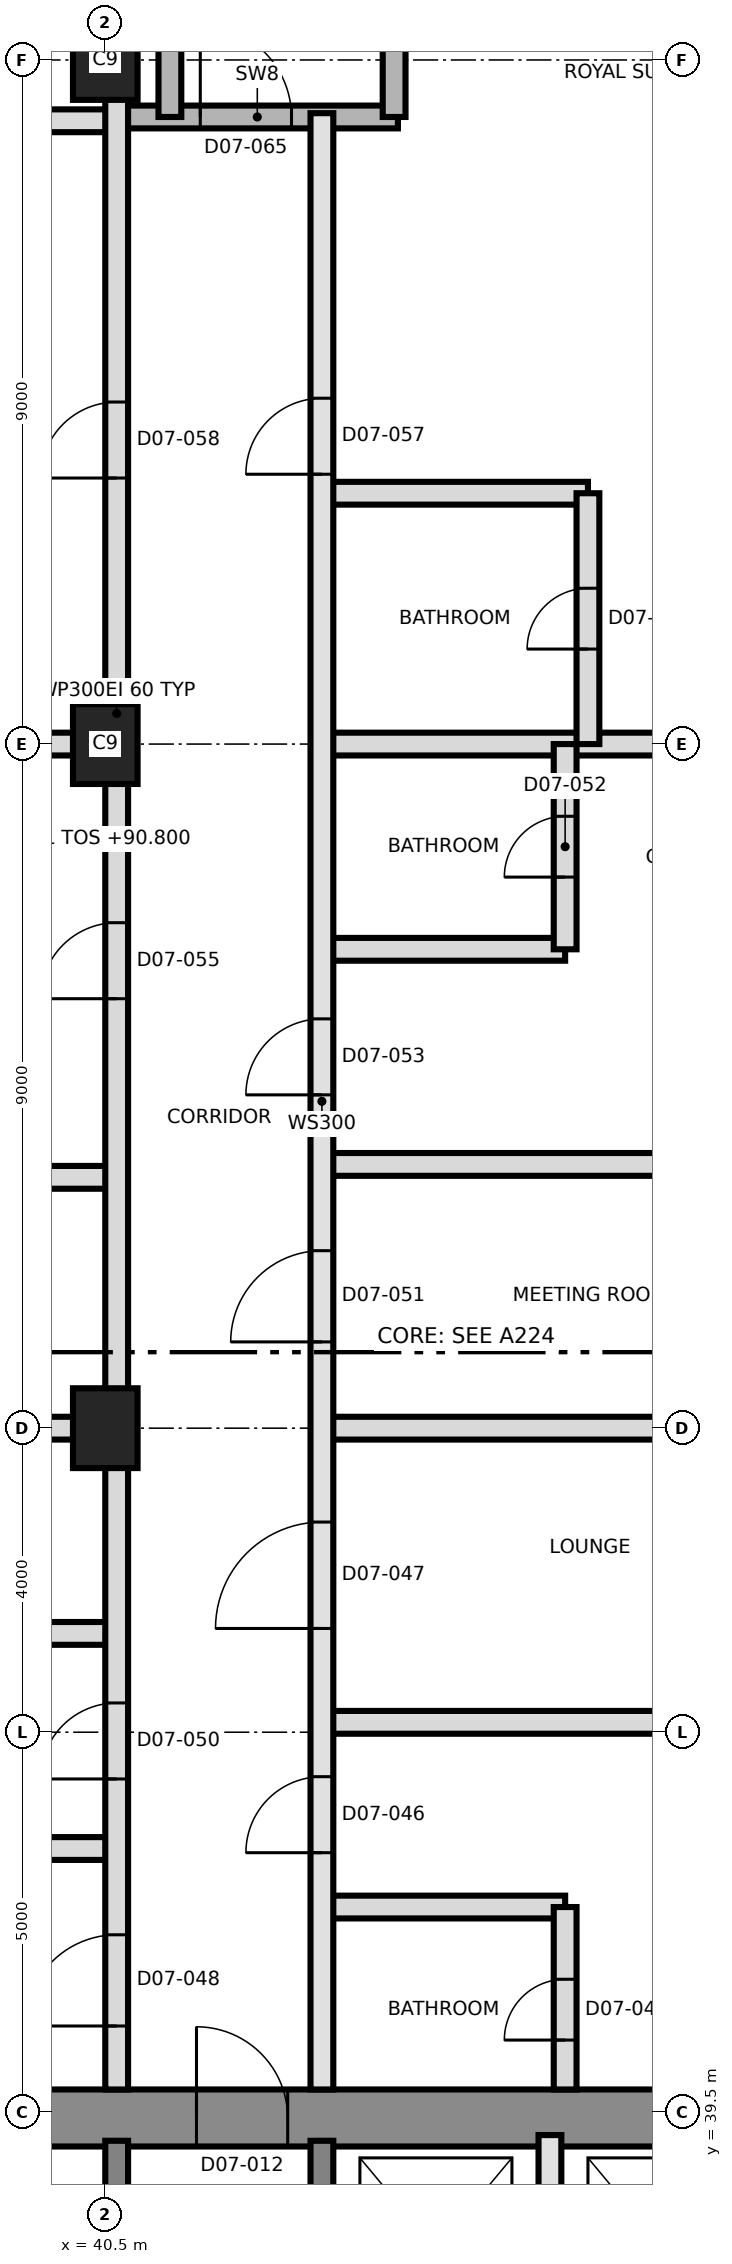
"""IFC4 building model, lengths in metres.
Left out: names, types, materials, properties, quantities, classifications, styles, units other than length and angle.
Written with IfcOpenShell. Run it as: python <this file> out.ifc"""

import sys

from ifc_helpers import new_model, si_unit, direction, frame, frame_2d, origin, origin_2d, place, context, subcontext, project, spatial, rectangle, extrude, element, fill, save


model = new_model("IFC4")
c1 = context("Model", 3, precision=1e-05, world=origin(), true_north=direction((0.0, 1.0)))
c2 = subcontext(c1, "Body", "Model", "MODEL_VIEW")
j1 = project(units=[si_unit("LENGTHUNIT", "METRE"), si_unit("PLANEANGLEUNIT", "RADIAN")], contexts=[c1])
p1 = place(None, origin())
s1 = spatial("IfcSite", under=j1, at=p1, CompositionType="ELEMENT")
p2 = place(p1, origin())
s2 = spatial("IfcBuilding", under=s1, at=p2, CompositionType="ELEMENT")
p3 = place(p2, frame((0.0, 0.0, 90.8)))
s3 = spatial("IfcBuildingStorey", under=s2, at=p3, CompositionType="ELEMENT", Elevation=90.8)
p4 = place(p3, frame((31.125, 39.425, 0.0), z_axis=(0.0, 0.0, 1.0), x_axis=(1.0, 0.0, 0.0)))
e1 = element("IfcWall", 1, at=p4, inside=s3, PredefinedType="SHEAR", context=c2, shape_type="SweptSolid", body=[
    extrude(rectangle(XDim=27.0, YDim=0.75, at=frame_2d((13.5, 0.0))), origin(), (0.0, 0.0, 1.0), 3.7),
])
p5 = place(p4, frame((10.575, 0.0, 0.0)))
e2 = element("IfcOpeningElement", 2, at=p5, cuts=e1, PredefinedType="OPENING", context=c2, shape_type="SweptSolid", body=[
    extrude(rectangle(XDim=1.2, YDim=2.1, at=frame_2d((0.6, 1.05))), frame((0.0, 0.385, 0.0), z_axis=(0.0, -1.0, 0.0), x_axis=(1.0, 0.0, 0.0)), (0.0, 0.0, 1.0), 0.77),
])
for number, where, z_axis, x_axis in (
    (3, (40.65, 33.5, 0.0), (0.0, 0.0, 1.0), (0.0, 1.0, 0.0)),
    (4, (43.35, 33.5, 0.0), (0.0, 0.0, 1.0), (0.0, 1.0, 0.0)),
):
    element("IfcWall", number, at=place(p3, frame(where, z_axis=z_axis, x_axis=x_axis)), inside=s3, PredefinedType="SHEAR", context=c2, shape_type="SweptSolid", body=[
        extrude(rectangle(XDim=5.625, YDim=0.3, at=frame_2d((2.812, 0.0))), origin(), (0.0, 0.0, 1.0), 3.7),
    ])
for number, where, z_axis, x_axis in (
    (5, (40.5, 48.5, 0.0), (0.0, 0.0, 1.0), (0.0, 1.0, 0.0)),
    (6, (40.5, 57.5, 0.0), (0.0, 0.0, 1.0), (0.0, 1.0, 0.0)),
    (7, (40.5, 66.5, 0.0), (0.0, 0.0, 1.0), (0.0, 1.0, 0.0)),
):
    element("IfcColumn", number, at=place(p3, frame(where, z_axis=z_axis, x_axis=x_axis)), inside=s3, PredefinedType="COLUMN", context=c2, shape_type="SweptSolid", body=[
        extrude(rectangle(XDim=1.05, YDim=0.85, at=origin_2d()), origin(), (0.0, 0.0, 1.0), 3.7),
    ])
p6 = place(p3, frame((46.35, 36.2, 0.0), z_axis=(0.0, 0.0, 1.0), x_axis=(0.0, 1.0, 0.0)))
e8 = element("IfcWall", 8, at=p6, inside=s3, PredefinedType="SOLIDWALL", context=c2, shape_type="SweptSolid", body=[
    extrude(rectangle(XDim=3.0, YDim=0.3, at=frame_2d((1.5, 0.0))), origin(), (0.0, 0.0, 1.0), 3.4),
])
p7 = place(p3, frame((43.35, 42.2, 0.0), z_axis=(0.0, 0.0, 1.0), x_axis=(1.0, 0.0, 0.0)))
e9 = element("IfcWall", 9, at=p7, inside=s3, PredefinedType="PARTITIONING", context=c2, shape_type="SweptSolid", body=[
    extrude(rectangle(XDim=3.2, YDim=0.3, at=frame_2d((1.6, 0.0))), origin(), (0.0, 0.0, 1.0), 3.4),
])
p8 = place(p3, frame((30.995, 42.97, 0.0), z_axis=(0.0, 0.0, 1.0), x_axis=(1.0, 0.0, 0.0)))
e10 = element("IfcWall", 10, at=p8, inside=s3, PredefinedType="PARTITIONING", context=c2, shape_type="SweptSolid", body=[
    extrude(rectangle(XDim=9.655, YDim=0.3, at=frame_2d((4.827, 0.0))), origin(), (0.0, 0.0, 1.0), 3.4),
])
p9 = place(p3, frame((43.35, 44.63, 0.0), z_axis=(0.0, 0.0, 1.0), x_axis=(1.0, 0.0, 0.0)))
e11 = element("IfcWall", 11, at=p9, inside=s3, PredefinedType="PARTITIONING", context=c2, shape_type="SweptSolid", body=[
    extrude(rectangle(XDim=7.032, YDim=0.3, at=frame_2d((3.516, 0.0))), origin(), (0.0, 0.0, 1.0), 3.4),
])
p10 = place(p3, frame((37.45, 45.8, 0.0), z_axis=(0.0, 0.0, 1.0), x_axis=(1.0, 0.0, 0.0)))
e12 = element("IfcWall", 12, at=p10, inside=s3, PredefinedType="PARTITIONING", context=c2, shape_type="SweptSolid", body=[
    extrude(rectangle(XDim=3.2, YDim=0.3, at=frame_2d((1.6, 0.0))), origin(), (0.0, 0.0, 1.0), 3.4),
])
p11 = place(p3, frame((30.995, 48.5, 0.0), z_axis=(0.0, 0.0, 1.0), x_axis=(1.0, 0.0, 0.0)))
e13 = element("IfcWall", 13, at=p11, inside=s3, PredefinedType="PARTITIONING", context=c2, shape_type="SweptSolid", body=[
    extrude(rectangle(XDim=9.655, YDim=0.3, at=frame_2d((4.827, 0.0))), origin(), (0.0, 0.0, 1.0), 3.4),
])
p12 = place(p3, frame((43.35, 48.5, 0.0), z_axis=(0.0, 0.0, 1.0), x_axis=(1.0, 0.0, 0.0)))
e14 = element("IfcWall", 14, at=p12, inside=s3, PredefinedType="PARTITIONING", context=c2, shape_type="SweptSolid", body=[
    extrude(rectangle(XDim=6.655, YDim=0.3, at=frame_2d((3.327, 0.0))), origin(), (0.0, 0.0, 1.0), 3.4),
])
p13 = place(p3, frame((37.15, 51.8, 0.0), z_axis=(0.0, 0.0, 1.0), x_axis=(1.0, 0.0, 0.0)))
e15 = element("IfcWall", 15, at=p13, inside=s3, PredefinedType="PARTITIONING", context=c2, shape_type="SweptSolid", body=[
    extrude(rectangle(XDim=3.5, YDim=0.3, at=frame_2d((1.75, 0.0))), origin(), (0.0, 0.0, 1.0), 3.4),
])
p14 = place(p3, frame((43.35, 51.97, 0.0), z_axis=(0.0, 0.0, 1.0), x_axis=(1.0, 0.0, 0.0)))
e16 = element("IfcWall", 16, at=p14, inside=s3, PredefinedType="PARTITIONING", context=c2, shape_type="SweptSolid", body=[
    extrude(rectangle(XDim=6.795, YDim=0.3, at=frame_2d((3.397, 0.0))), origin(), (0.0, 0.0, 1.0), 3.4),
])
p15 = place(p3, frame((43.35, 54.8, 0.0), z_axis=(0.0, 0.0, 1.0), x_axis=(1.0, 0.0, 0.0)))
e17 = element("IfcWall", 17, at=p15, inside=s3, PredefinedType="PARTITIONING", context=c2, shape_type="SweptSolid", body=[
    extrude(rectangle(XDim=3.2, YDim=0.3, at=frame_2d((1.6, 0.0))), origin(), (0.0, 0.0, 1.0), 3.4),
])
p16 = place(p3, frame((30.995, 57.5, 0.0), z_axis=(0.0, 0.0, 1.0), x_axis=(1.0, 0.0, 0.0)))
e18 = element("IfcWall", 18, at=p16, inside=s3, PredefinedType="PARTITIONING", context=c2, shape_type="SweptSolid", body=[
    extrude(rectangle(XDim=9.655, YDim=0.3, at=frame_2d((4.827, 0.0))), origin(), (0.0, 0.0, 1.0), 3.4),
])
p17 = place(p3, frame((43.35, 57.5, 0.0), z_axis=(0.0, 0.0, 1.0), x_axis=(1.0, 0.0, 0.0)))
e19 = element("IfcWall", 19, at=p17, inside=s3, PredefinedType="PARTITIONING", context=c2, shape_type="SweptSolid", body=[
    extrude(rectangle(XDim=6.655, YDim=0.3, at=frame_2d((3.327, 0.0))), origin(), (0.0, 0.0, 1.0), 3.4),
])
p18 = place(p3, frame((43.35, 60.8, 0.0), z_axis=(0.0, 0.0, 1.0), x_axis=(1.0, 0.0, 0.0)))
e20 = element("IfcWall", 20, at=p18, inside=s3, PredefinedType="PARTITIONING", context=c2, shape_type="SweptSolid", body=[
    extrude(rectangle(XDim=3.5, YDim=0.3, at=frame_2d((1.75, 0.0))), origin(), (0.0, 0.0, 1.0), 3.4),
])
p19 = place(p3, frame((30.995, 65.7, 0.0), z_axis=(0.0, 0.0, 1.0), x_axis=(1.0, 0.0, 0.0)))
e21 = element("IfcWall", 21, at=p19, inside=s3, PredefinedType="PARTITIONING", context=c2, shape_type="SweptSolid", body=[
    extrude(rectangle(XDim=9.655, YDim=0.3, at=frame_2d((4.827, 0.0))), origin(), (0.0, 0.0, 1.0), 3.4),
])
p20 = place(p19, frame((4.005, 0.0, 0.0)))
e22 = element("IfcOpeningElement", 22, at=p20, cuts=e21, PredefinedType="OPENING", context=c2, shape_type="SweptSolid", body=[
    extrude(rectangle(XDim=1.0, YDim=2.1, at=frame_2d((0.5, 1.05))), frame((0.0, 0.16, 0.0), z_axis=(0.0, -1.0, 0.0), x_axis=(1.0, 0.0, 0.0)), (0.0, 0.0, 1.0), 0.32),
])
p21 = place(p3, frame((40.65, 65.75, 0.0), z_axis=(0.0, 0.0, 1.0), x_axis=(1.0, 0.0, 0.0)))
e23 = element("IfcWall", 23, at=p21, inside=s3, PredefinedType="SHEAR", context=c2, shape_type="SweptSolid", body=[
    extrude(rectangle(XDim=3.7, YDim=0.3, at=frame_2d((1.85, 0.0))), origin(), (0.0, 0.0, 1.0), 3.4),
])
p22 = place(p21, frame((1.1, 0.0, 0.0)))
e24 = element("IfcOpeningElement", 24, at=p22, cuts=e23, PredefinedType="OPENING", context=c2, shape_type="SweptSolid", body=[
    extrude(rectangle(XDim=1.2, YDim=2.1, at=frame_2d((0.6, 1.05))), frame((0.0, 0.16, 0.0), z_axis=(0.0, -1.0, 0.0), x_axis=(1.0, 0.0, 0.0)), (0.0, 0.0, 1.0), 0.32),
])
p23 = place(p3, frame((40.65, 39.8, 0.0), z_axis=(0.0, 0.0, 1.0), x_axis=(0.0, 1.0, 0.0)))
e25 = element("IfcWall", 25, at=p23, inside=s3, PredefinedType="PARTITIONING", context=c2, shape_type="SweptSolid", body=[
    extrude(rectangle(XDim=36.205, YDim=0.3, at=frame_2d((18.103, 0.0))), origin(), (0.0, 0.0, 1.0), 3.4),
])
p24 = place(p23, frame((0.835, 0.0, 0.0)))
e26 = element("IfcOpeningElement", 26, at=p24, cuts=e25, PredefinedType="OPENING", context=c2, shape_type="SweptSolid", body=[
    extrude(rectangle(XDim=1.2, YDim=2.1, at=frame_2d((0.6, 1.05))), frame((0.0, 0.16, 0.0), z_axis=(0.0, -1.0, 0.0), x_axis=(1.0, 0.0, 0.0)), (0.0, 0.0, 1.0), 0.32),
])
p25 = place(p23, frame((4.085, 0.0, 0.0)))
e27 = element("IfcOpeningElement", 27, at=p25, cuts=e25, PredefinedType="OPENING", context=c2, shape_type="SweptSolid", body=[
    extrude(rectangle(XDim=1.0, YDim=2.1, at=frame_2d((0.5, 1.05))), frame((0.0, 0.16, 0.0), z_axis=(0.0, -1.0, 0.0), x_axis=(1.0, 0.0, 0.0)), (0.0, 0.0, 1.0), 0.32),
])
p26 = place(p23, frame((14.35, 0.0, 0.0)))
e28 = element("IfcOpeningElement", 28, at=p26, cuts=e25, PredefinedType="OPENING", context=c2, shape_type="SweptSolid", body=[
    extrude(rectangle(XDim=1.0, YDim=2.4, at=frame_2d((0.5, 1.2))), frame((0.0, 0.16, 0.0), z_axis=(0.0, -1.0, 0.0), x_axis=(1.0, 0.0, 0.0)), (0.0, 0.0, 1.0), 0.32),
])
p27 = place(p23, frame((21.2, 0.0, 0.0)))
e29 = element("IfcOpeningElement", 29, at=p27, cuts=e25, PredefinedType="OPENING", context=c2, shape_type="SweptSolid", body=[
    extrude(rectangle(XDim=1.0, YDim=2.4, at=frame_2d((0.5, 1.2))), frame((0.0, 0.16, 0.0), z_axis=(0.0, -1.0, 0.0), x_axis=(1.0, 0.0, 0.0)), (0.0, 0.0, 1.0), 0.32),
])
p28 = place(p3, frame((41.35, 65.75, 0.0), z_axis=(0.0, 0.0, 1.0), x_axis=(0.0, 1.0, 0.0)))
e30 = element("IfcWall", 30, at=p28, inside=s3, PredefinedType="SHEAR", context=c2, shape_type="SweptSolid", body=[
    extrude(rectangle(XDim=8.85, YDim=0.3, at=frame_2d((4.425, 0.0))), origin(), (0.0, 0.0, 1.0), 3.4),
])
p29 = place(p3, frame((43.35, 39.8, 0.0), z_axis=(0.0, 0.0, 1.0), x_axis=(0.0, 1.0, 0.0)))
e31 = element("IfcWall", 31, at=p29, inside=s3, PredefinedType="SOLIDWALL", context=c2, shape_type="SweptSolid", body=[
    extrude(rectangle(XDim=26.0, YDim=0.3, at=frame_2d((13.0, 0.0))), origin(), (0.0, 0.0, 1.0), 3.4),
])
p30 = place(p29, frame((3.115, 0.0, 0.0)))
e32 = element("IfcOpeningElement", 32, at=p30, cuts=e31, PredefinedType="OPENING", context=c2, shape_type="SweptSolid", body=[
    extrude(rectangle(XDim=1.0, YDim=2.1, at=frame_2d((0.5, 1.05))), frame((0.0, 0.16, 0.0), z_axis=(0.0, -1.0, 0.0), x_axis=(1.0, 0.0, 0.0)), (0.0, 0.0, 1.0), 0.32),
])
p31 = place(p29, frame((6.065, 0.0, 0.0)))
e33 = element("IfcOpeningElement", 33, at=p31, cuts=e31, PredefinedType="OPENING", context=c2, shape_type="SweptSolid", body=[
    extrude(rectangle(XDim=1.4, YDim=2.1, at=frame_2d((0.7, 1.05))), frame((0.0, 0.16, 0.0), z_axis=(0.0, -1.0, 0.0), x_axis=(1.0, 0.0, 0.0)), (0.0, 0.0, 1.0), 0.32),
])
p32 = place(p29, frame((9.835, 0.0, 0.0)))
e34 = element("IfcOpeningElement", 34, at=p32, cuts=e31, PredefinedType="OPENING", context=c2, shape_type="SweptSolid", body=[
    extrude(rectangle(XDim=1.2, YDim=2.1, at=frame_2d((0.6, 1.05))), frame((0.0, 0.16, 0.0), z_axis=(0.0, -1.0, 0.0), x_axis=(1.0, 0.0, 0.0)), (0.0, 0.0, 1.0), 0.32),
])
p33 = place(p29, frame((13.085, 0.0, 0.0)))
e35 = element("IfcOpeningElement", 35, at=p33, cuts=e31, PredefinedType="OPENING", context=c2, shape_type="SweptSolid", body=[
    extrude(rectangle(XDim=1.0, YDim=2.1, at=frame_2d((0.5, 1.05))), frame((0.0, 0.16, 0.0), z_axis=(0.0, -1.0, 0.0), x_axis=(1.0, 0.0, 0.0)), (0.0, 0.0, 1.0), 0.32),
])
p34 = place(p29, frame((21.25, 0.0, 0.0)))
e36 = element("IfcOpeningElement", 36, at=p34, cuts=e31, PredefinedType="OPENING", context=c2, shape_type="SweptSolid", body=[
    extrude(rectangle(XDim=1.0, YDim=2.4, at=frame_2d((0.5, 1.2))), frame((0.0, 0.16, 0.0), z_axis=(0.0, -1.0, 0.0), x_axis=(1.0, 0.0, 0.0)), (0.0, 0.0, 1.0), 0.32),
])
p35 = place(p3, frame((44.3, 65.75, 0.0), z_axis=(0.0, 0.0, 1.0), x_axis=(0.0, 1.0, 0.0)))
e37 = element("IfcWall", 37, at=p35, inside=s3, PredefinedType="SHEAR", context=c2, shape_type="SweptSolid", body=[
    extrude(rectangle(XDim=8.85, YDim=0.3, at=frame_2d((4.425, 0.0))), origin(), (0.0, 0.0, 1.0), 3.4),
])
p36 = place(p3, frame((46.55, 39.8, 0.0), z_axis=(0.0, 0.0, 1.0), x_axis=(0.0, 1.0, 0.0)))
e38 = element("IfcWall", 38, at=p36, inside=s3, PredefinedType="PARTITIONING", context=c2, shape_type="SweptSolid", body=[
    extrude(rectangle(XDim=2.4, YDim=0.3, at=frame_2d((1.2, 0.0))), origin(), (0.0, 0.0, 1.0), 3.4),
])
p37 = place(p36, frame((0.65, 0.0, 0.0)))
e39 = element("IfcOpeningElement", 39, at=p37, cuts=e38, PredefinedType="OPENING", context=c2, shape_type="SweptSolid", body=[
    extrude(rectangle(XDim=0.8, YDim=2.1, at=frame_2d((0.4, 1.05))), frame((0.0, 0.16, 0.0), z_axis=(0.0, -1.0, 0.0), x_axis=(1.0, 0.0, 0.0)), (0.0, 0.0, 1.0), 0.32),
])
p38 = place(p3, frame((46.55, 54.8, 0.0), z_axis=(0.0, 0.0, 1.0), x_axis=(0.0, 1.0, 0.0)))
e40 = element("IfcWall", 40, at=p38, inside=s3, PredefinedType="PARTITIONING", context=c2, shape_type="SweptSolid", body=[
    extrude(rectangle(XDim=2.7, YDim=0.3, at=frame_2d((1.35, 0.0))), origin(), (0.0, 0.0, 1.0), 3.4),
])
p39 = place(p38, frame((0.95, 0.0, 0.0)))
e41 = element("IfcOpeningElement", 41, at=p39, cuts=e40, PredefinedType="OPENING", context=c2, shape_type="SweptSolid", body=[
    extrude(rectangle(XDim=0.8, YDim=2.1, at=frame_2d((0.4, 1.05))), frame((0.0, 0.16, 0.0), z_axis=(0.0, -1.0, 0.0), x_axis=(1.0, 0.0, 0.0)), (0.0, 0.0, 1.0), 0.32),
])
p40 = place(p3, frame((46.85, 57.5, 0.0), z_axis=(0.0, 0.0, 1.0), x_axis=(0.0, 1.0, 0.0)))
e42 = element("IfcWall", 42, at=p40, inside=s3, PredefinedType="PARTITIONING", context=c2, shape_type="SweptSolid", body=[
    extrude(rectangle(XDim=3.3, YDim=0.3, at=frame_2d((1.65, 0.0))), origin(), (0.0, 0.0, 1.0), 3.4),
])
p41 = place(p40, frame((1.25, 0.0, 0.0)))
e43 = element("IfcOpeningElement", 43, at=p41, cuts=e42, PredefinedType="OPENING", context=c2, shape_type="SweptSolid", body=[
    extrude(rectangle(XDim=0.8, YDim=2.1, at=frame_2d((0.4, 1.05))), frame((0.0, 0.16, 0.0), z_axis=(0.0, -1.0, 0.0), x_axis=(1.0, 0.0, 0.0)), (0.0, 0.0, 1.0), 0.32),
])
p42 = place(p5, origin())
e44 = element("IfcDoor", 44, at=p42, inside=s3, OperationType="SINGLE_SWING_RIGHT", PredefinedType="DOOR", context=c2, shape_type="SweptSolid", body=[
    extrude(rectangle(XDim=1.2, YDim=2.1, at=frame_2d((0.6, 1.05))), frame((0.0, 0.025, 0.0), z_axis=(0.0, -1.0, 0.0), x_axis=(1.0, 0.0, 0.0)), (0.0, 0.0, 1.0), 0.05),
])
fill(e2, e44)
p43 = place(p37, origin())
e45 = element("IfcDoor", 45, at=p43, inside=s3, OperationType="SINGLE_SWING_RIGHT", PredefinedType="DOOR", context=c2, shape_type="SweptSolid", body=[
    extrude(rectangle(XDim=0.8, YDim=2.1, at=frame_2d((0.4, 1.05))), frame((0.0, 0.025, 0.0), z_axis=(0.0, -1.0, 0.0), x_axis=(1.0, 0.0, 0.0)), (0.0, 0.0, 1.0), 0.05),
])
fill(e39, e45)
p44 = place(p30, origin())
e46 = element("IfcDoor", 46, at=p44, inside=s3, OperationType="SINGLE_SWING_LEFT", PredefinedType="DOOR", context=c2, shape_type="SweptSolid", body=[
    extrude(rectangle(XDim=1.0, YDim=2.1, at=frame_2d((0.5, 1.05))), frame((0.0, 0.025, 0.0), z_axis=(0.0, -1.0, 0.0), x_axis=(1.0, 0.0, 0.0)), (0.0, 0.0, 1.0), 0.05),
])
fill(e32, e46)
p45 = place(p31, origin())
e47 = element("IfcDoor", 47, at=p45, inside=s3, OperationType="SINGLE_SWING_LEFT", PredefinedType="DOOR", context=c2, shape_type="SweptSolid", body=[
    extrude(rectangle(XDim=1.4, YDim=2.1, at=frame_2d((0.7, 1.05))), frame((0.0, 0.025, 0.0), z_axis=(0.0, -1.0, 0.0), x_axis=(1.0, 0.0, 0.0)), (0.0, 0.0, 1.0), 0.05),
])
fill(e33, e47)
p46 = place(p24, origin())
e48 = element("IfcDoor", 48, at=p46, inside=s3, OperationType="SINGLE_SWING_LEFT", PredefinedType="DOOR", context=c2, shape_type="SweptSolid", body=[
    extrude(rectangle(XDim=1.2, YDim=2.1, at=frame_2d((0.6, 1.05))), frame((0.0, 0.025, 0.0), z_axis=(0.0, -1.0, 0.0), x_axis=(1.0, 0.0, 0.0)), (0.0, 0.0, 1.0), 0.05),
])
fill(e26, e48)
p47 = place(p25, origin())
e49 = element("IfcDoor", 49, at=p47, inside=s3, OperationType="SINGLE_SWING_RIGHT", PredefinedType="DOOR", context=c2, shape_type="SweptSolid", body=[
    extrude(rectangle(XDim=1.0, YDim=2.1, at=frame_2d((0.5, 1.05))), frame((0.0, 0.025, 0.0), z_axis=(0.0, -1.0, 0.0), x_axis=(1.0, 0.0, 0.0)), (0.0, 0.0, 1.0), 0.05),
])
fill(e27, e49)
p48 = place(p32, origin())
e50 = element("IfcDoor", 50, at=p48, inside=s3, OperationType="SINGLE_SWING_LEFT", PredefinedType="DOOR", context=c2, shape_type="SweptSolid", body=[
    extrude(rectangle(XDim=1.2, YDim=2.1, at=frame_2d((0.6, 1.05))), frame((0.0, 0.025, 0.0), z_axis=(0.0, -1.0, 0.0), x_axis=(1.0, 0.0, 0.0)), (0.0, 0.0, 1.0), 0.05),
])
fill(e34, e50)
p49 = place(p39, origin())
e51 = element("IfcDoor", 51, at=p49, inside=s3, OperationType="SINGLE_SWING_LEFT", PredefinedType="DOOR", context=c2, shape_type="SweptSolid", body=[
    extrude(rectangle(XDim=0.8, YDim=2.1, at=frame_2d((0.4, 1.05))), frame((0.0, 0.025, 0.0), z_axis=(0.0, -1.0, 0.0), x_axis=(1.0, 0.0, 0.0)), (0.0, 0.0, 1.0), 0.05),
])
fill(e41, e51)
p50 = place(p33, origin())
e52 = element("IfcDoor", 52, at=p50, inside=s3, OperationType="SINGLE_SWING_RIGHT", PredefinedType="DOOR", context=c2, shape_type="SweptSolid", body=[
    extrude(rectangle(XDim=1.0, YDim=2.1, at=frame_2d((0.5, 1.05))), frame((0.0, 0.025, 0.0), z_axis=(0.0, -1.0, 0.0), x_axis=(1.0, 0.0, 0.0)), (0.0, 0.0, 1.0), 0.05),
])
fill(e35, e52)
p51 = place(p26, origin())
e53 = element("IfcDoor", 53, at=p51, inside=s3, OperationType="SINGLE_SWING_LEFT", PredefinedType="DOOR", context=c2, shape_type="SweptSolid", body=[
    extrude(rectangle(XDim=1.0, YDim=2.4, at=frame_2d((0.5, 1.2))), frame((0.0, 0.025, 0.0), z_axis=(0.0, -1.0, 0.0), x_axis=(1.0, 0.0, 0.0)), (0.0, 0.0, 1.0), 0.05),
])
fill(e28, e53)
p52 = place(p41, origin())
e54 = element("IfcDoor", 54, at=p52, inside=s3, OperationType="SINGLE_SWING_LEFT", PredefinedType="DOOR", context=c2, shape_type="SweptSolid", body=[
    extrude(rectangle(XDim=0.8, YDim=2.1, at=frame_2d((0.4, 1.05))), frame((0.0, 0.025, 0.0), z_axis=(0.0, -1.0, 0.0), x_axis=(1.0, 0.0, 0.0)), (0.0, 0.0, 1.0), 0.05),
])
fill(e43, e54)
p53 = place(p34, origin())
e55 = element("IfcDoor", 55, at=p53, inside=s3, OperationType="SINGLE_SWING_LEFT", PredefinedType="DOOR", context=c2, shape_type="SweptSolid", body=[
    extrude(rectangle(XDim=1.0, YDim=2.4, at=frame_2d((0.5, 1.2))), frame((0.0, 0.025, 0.0), z_axis=(0.0, -1.0, 0.0), x_axis=(1.0, 0.0, 0.0)), (0.0, 0.0, 1.0), 0.05),
])
fill(e36, e55)
p54 = place(p27, origin())
e56 = element("IfcDoor", 56, at=p54, inside=s3, OperationType="SINGLE_SWING_RIGHT", PredefinedType="DOOR", context=c2, shape_type="SweptSolid", body=[
    extrude(rectangle(XDim=1.0, YDim=2.4, at=frame_2d((0.5, 1.2))), frame((0.0, 0.025, 0.0), z_axis=(0.0, -1.0, 0.0), x_axis=(1.0, 0.0, 0.0)), (0.0, 0.0, 1.0), 0.05),
])
fill(e29, e56)
p55 = place(p22, origin())
e57 = element("IfcDoor", 57, at=p55, inside=s3, OperationType="SINGLE_SWING_RIGHT", PredefinedType="DOOR", context=c2, shape_type="SweptSolid", body=[
    extrude(rectangle(XDim=1.2, YDim=2.1, at=frame_2d((0.6, 1.05))), frame((0.0, 0.025, 0.0), z_axis=(0.0, -1.0, 0.0), x_axis=(1.0, 0.0, 0.0)), (0.0, 0.0, 1.0), 0.05),
])
fill(e24, e57)
save(model, sys.argv[1])
